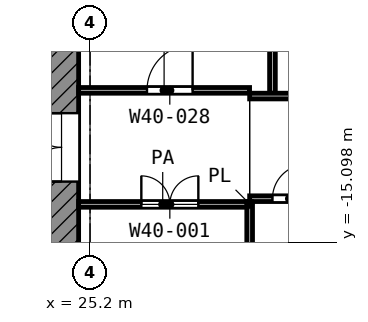
"""IFC4 building model, lengths in metres.
Left out: names, types, materials, properties, quantities, classifications, styles, units other than length and angle.
Written with IfcOpenShell. Run it as: python <this file> out.ifc"""

import sys

from ifc_helpers import new_model, si_unit, direction, frame, frame_2d, origin, place, context, subcontext, project, spatial, rectangle, extrude, element, fill, save


model = new_model("IFC4")
c1 = context("Model", 3, precision=1e-05, world=origin(), true_north=direction((0.0, 1.0)))
c2 = subcontext(c1, "Body", "Model", "MODEL_VIEW")
j1 = project(units=[si_unit("LENGTHUNIT", "METRE"), si_unit("PLANEANGLEUNIT", "RADIAN")], contexts=[c1])
p1 = place(None, origin())
s1 = spatial("IfcSite", under=j1, at=p1, CompositionType="ELEMENT")
p2 = place(p1, origin())
s2 = spatial("IfcBuilding", under=s1, at=p2, CompositionType="ELEMENT")
p3 = place(p2, frame((0.0, 0.0, 196.2)))
s3 = spatial("IfcBuildingStorey", under=s2, at=p3, CompositionType="ELEMENT", Elevation=196.2)
p4 = place(p3, frame((24.45, -24.0, 0.0), z_axis=(0.0, 0.0, 1.0), x_axis=(0.0, 1.0, 0.0)))
e1 = element("IfcWall", 1, at=p4, inside=s3, PredefinedType="SHEAR", context=c2, shape_type="SweptSolid", body=[
    extrude(rectangle(XDim=18.6, YDim=0.9, at=frame_2d((9.3, 0.0))), origin(), (0.0, 0.0, 1.0), 3.6),
])
p5 = place(p4, frame((10.5, 0.0, 0.0)))
e2 = element("IfcOpeningElement", 2, at=p5, cuts=e1, PredefinedType="OPENING", context=c2, shape_type="SweptSolid", body=[
    extrude(rectangle(XDim=1.8, YDim=2.1, at=frame_2d((0.9, 1.05))), frame((0.0, 0.46, 0.0), z_axis=(0.0, -1.0, 0.0), x_axis=(1.0, 0.0, 0.0)), (0.0, 0.0, 1.0), 0.92),
])
p6 = place(p3, frame((29.4, -14.147, 0.0), z_axis=(0.0, 0.0, 1.0), x_axis=(0.0, 1.0, 0.0)))
e3 = element("IfcWall", 3, at=p6, inside=s3, PredefinedType="PARTITIONING", context=c2, shape_type="SweptSolid", body=[
    extrude(rectangle(XDim=0.12, YDim=0.1, at=frame_2d((0.06, 0.0))), origin(), (0.0, 0.0, 1.0), 3.6),
])
p7 = place(p3, frame((24.9, -14.1, 0.0), z_axis=(0.0, 0.0, 1.0), x_axis=(1.0, 0.0, 0.0)))
e4 = element("IfcWall", 4, at=p7, inside=s3, PredefinedType="PARTITIONING", context=c2, shape_type="SweptSolid", body=[
    extrude(rectangle(XDim=4.425, YDim=0.15, at=frame_2d((2.212, 0.0))), origin(), (0.0, 0.0, 1.0), 3.6),
])
p8 = place(p7, frame((1.65, 0.0, 0.0)))
e5 = element("IfcOpeningElement", 5, at=p8, cuts=e4, PredefinedType="OPENING", context=c2, shape_type="SweptSolid", body=[
    extrude(rectangle(XDim=1.5, YDim=2.1, at=frame_2d((0.75, 1.05))), frame((0.0, 0.085, 0.0), z_axis=(0.0, -1.0, 0.0), x_axis=(1.0, 0.0, 0.0)), (0.0, 0.0, 1.0), 0.17),
])
p9 = place(p3, frame((29.4, -13.95, 0.0), z_axis=(0.0, 0.0, 1.0), x_axis=(1.0, 0.0, 0.0)))
e6 = element("IfcWall", 6, at=p9, inside=s3, PredefinedType="PARTITIONING", context=c2, shape_type="SweptSolid", body=[
    extrude(rectangle(XDim=37.72, YDim=0.15, at=frame_2d((18.86, 0.0))), origin(), (0.0, 0.0, 1.0), 3.6),
])
p10 = place(p9, frame((10.15, 0.0, 0.0)))
e7 = element("IfcOpeningElement", 7, at=p10, cuts=e6, PredefinedType="OPENING", context=c2, shape_type="SweptSolid", body=[
    extrude(rectangle(XDim=1.0, YDim=2.1, at=frame_2d((0.5, 1.05))), frame((0.0, 0.085, 0.0), z_axis=(0.0, -1.0, 0.0), x_axis=(1.0, 0.0, 0.0)), (0.0, 0.0, 1.0), 0.17),
])
p11 = place(p9, frame((12.8, 0.0, 0.0)))
e8 = element("IfcOpeningElement", 8, at=p11, cuts=e6, PredefinedType="OPENING", context=c2, shape_type="SweptSolid", body=[
    extrude(rectangle(XDim=1.1, YDim=2.1, at=frame_2d((0.55, 1.05))), frame((0.0, 0.085, 0.0), z_axis=(0.0, -1.0, 0.0), x_axis=(1.0, 0.0, 0.0)), (0.0, 0.0, 1.0), 0.17),
])
p12 = place(p9, frame((19.5, 0.0, 0.0)))
e9 = element("IfcOpeningElement", 9, at=p12, cuts=e6, PredefinedType="OPENING", context=c2, shape_type="SweptSolid", body=[
    extrude(rectangle(XDim=1.2, YDim=2.1, at=frame_2d((0.6, 1.05))), frame((0.0, 0.085, 0.0), z_axis=(0.0, -1.0, 0.0), x_axis=(1.0, 0.0, 0.0)), (0.0, 0.0, 1.0), 0.17),
])
p13 = place(p9, frame((21.7, 0.0, 0.0)))
e10 = element("IfcOpeningElement", 10, at=p13, cuts=e6, PredefinedType="OPENING", context=c2, shape_type="SweptSolid", body=[
    extrude(rectangle(XDim=1.2, YDim=2.1, at=frame_2d((0.6, 1.05))), frame((0.0, 0.085, 0.0), z_axis=(0.0, -1.0, 0.0), x_axis=(1.0, 0.0, 0.0)), (0.0, 0.0, 1.0), 0.17),
])
p14 = place(p9, frame((26.8, 0.0, 0.0)))
e11 = element("IfcOpeningElement", 11, at=p14, cuts=e6, PredefinedType="OPENING", context=c2, shape_type="SweptSolid", body=[
    extrude(rectangle(XDim=1.0, YDim=2.1, at=frame_2d((0.5, 1.05))), frame((0.0, 0.085, 0.0), z_axis=(0.0, -1.0, 0.0), x_axis=(1.0, 0.0, 0.0)), (0.0, 0.0, 1.0), 0.17),
])
p15 = place(p9, frame((31.3, 0.0, 0.0)))
e12 = element("IfcOpeningElement", 12, at=p15, cuts=e6, PredefinedType="OPENING", context=c2, shape_type="SweptSolid", body=[
    extrude(rectangle(XDim=1.0, YDim=2.1, at=frame_2d((0.5, 1.05))), frame((0.0, 0.085, 0.0), z_axis=(0.0, -1.0, 0.0), x_axis=(1.0, 0.0, 0.0)), (0.0, 0.0, 1.0), 0.17),
])
p16 = place(p9, frame((35.5, 0.0, 0.0)))
e13 = element("IfcOpeningElement", 13, at=p16, cuts=e6, PredefinedType="OPENING", context=c2, shape_type="SweptSolid", body=[
    extrude(rectangle(XDim=1.0, YDim=2.1, at=frame_2d((0.5, 1.05))), frame((0.0, 0.085, 0.0), z_axis=(0.0, -1.0, 0.0), x_axis=(1.0, 0.0, 0.0)), (0.0, 0.0, 1.0), 0.17),
])
p17 = place(p9, frame((0.6, 0.0, 0.0)))
e14 = element("IfcOpeningElement", 14, at=p17, cuts=e6, PredefinedType="OPENING", context=c2, shape_type="SweptSolid", body=[
    extrude(rectangle(XDim=0.9, YDim=2.1, at=frame_2d((0.45, 1.05))), frame((0.0, 0.085, 0.0), z_axis=(0.0, -1.0, 0.0), x_axis=(1.0, 0.0, 0.0)), (0.0, 0.0, 1.0), 0.17),
])
p18 = place(p9, frame((2.65, 0.0, 0.0)))
e15 = element("IfcOpeningElement", 15, at=p18, cuts=e6, PredefinedType="OPENING", context=c2, shape_type="SweptSolid", body=[
    extrude(rectangle(XDim=1.0, YDim=2.1, at=frame_2d((0.5, 1.05))), frame((0.0, 0.085, 0.0), z_axis=(0.0, -1.0, 0.0), x_axis=(1.0, 0.0, 0.0)), (0.0, 0.0, 1.0), 0.17),
])
p19 = place(p9, frame((5.85, 0.0, 0.0)))
e16 = element("IfcOpeningElement", 16, at=p19, cuts=e6, PredefinedType="OPENING", context=c2, shape_type="SweptSolid", body=[
    extrude(rectangle(XDim=1.2, YDim=2.1, at=frame_2d((0.6, 1.05))), frame((0.0, 0.085, 0.0), z_axis=(0.0, -1.0, 0.0), x_axis=(1.0, 0.0, 0.0)), (0.0, 0.0, 1.0), 0.17),
])
p20 = place(p3, frame((29.4, -11.25, 0.0), z_axis=(0.0, 0.0, 1.0), x_axis=(1.0, 0.0, 0.0)))
e17 = element("IfcWall", 17, at=p20, inside=s3, PredefinedType="PARTITIONING", context=c2, shape_type="SweptSolid", body=[
    extrude(rectangle(XDim=10.782, YDim=0.15, at=frame_2d((5.391, 0.0))), origin(), (0.0, 0.0, 1.0), 3.6),
])
p21 = place(p20, frame((1.9, 0.0, 0.0)))
e18 = element("IfcOpeningElement", 18, at=p21, cuts=e17, PredefinedType="OPENING", context=c2, shape_type="SweptSolid", body=[
    extrude(rectangle(XDim=1.0, YDim=2.1, at=frame_2d((0.5, 1.05))), frame((0.0, 0.085, 0.0), z_axis=(0.0, -1.0, 0.0), x_axis=(1.0, 0.0, 0.0)), (0.0, 0.0, 1.0), 0.17),
])
p22 = place(p20, frame((4.4, 0.0, 0.0)))
e19 = element("IfcOpeningElement", 19, at=p22, cuts=e17, PredefinedType="OPENING", context=c2, shape_type="SweptSolid", body=[
    extrude(rectangle(XDim=1.2, YDim=2.1, at=frame_2d((0.6, 1.05))), frame((0.0, 0.085, 0.0), z_axis=(0.0, -1.0, 0.0), x_axis=(1.0, 0.0, 0.0)), (0.0, 0.0, 1.0), 0.17),
])
p23 = place(p3, frame((24.9, -11.1, 0.0), z_axis=(0.0, 0.0, 1.0), x_axis=(1.0, 0.0, 0.0)))
e20 = element("IfcWall", 20, at=p23, inside=s3, PredefinedType="PARTITIONING", context=c2, shape_type="SweptSolid", body=[
    extrude(rectangle(XDim=4.498, YDim=0.15, at=frame_2d((2.249, 0.0))), origin(), (0.0, 0.0, 1.0), 3.6),
])
p24 = place(p23, frame((1.799, 0.0, 0.0)))
e21 = element("IfcOpeningElement", 21, at=p24, cuts=e20, PredefinedType="OPENING", context=c2, shape_type="SweptSolid", body=[
    extrude(rectangle(XDim=1.2, YDim=2.1, at=frame_2d((0.6, 1.05))), frame((0.0, 0.085, 0.0), z_axis=(0.0, -1.0, 0.0), x_axis=(1.0, 0.0, 0.0)), (0.0, 0.0, 1.0), 0.17),
])
p25 = place(p3, frame((29.4, -31.198, 0.0), z_axis=(0.0, 0.0, 1.0), x_axis=(0.0, 1.0, 0.0)))
e22 = element("IfcWall", 22, at=p25, inside=s3, PredefinedType="PARTITIONING", context=c2, shape_type="SweptSolid", body=[
    extrude(rectangle(XDim=17.098, YDim=0.15, at=frame_2d((8.549, 0.0))), origin(), (0.0, 0.0, 1.0), 3.6),
])
p26 = place(p3, frame((30.0, -11.175, 0.0), z_axis=(0.0, 0.0, 1.0), x_axis=(0.0, 1.0, 0.0)))
e23 = element("IfcWall", 23, at=p26, inside=s3, PredefinedType="PARTITIONING", context=c2, shape_type="SweptSolid", body=[
    extrude(rectangle(XDim=11.095, YDim=0.15, at=frame_2d((5.547, 0.0))), origin(), (0.0, 0.0, 1.0), 2.7),
])
p27 = place(p5, origin())
e24 = element("IfcDoor", 24, at=p27, inside=s3, OperationType="DOUBLE_DOOR_SINGLE_SWING", PredefinedType="DOOR", context=c2, shape_type="SweptSolid", body=[
    extrude(rectangle(XDim=1.8, YDim=2.1, at=frame_2d((0.9, 1.05))), frame((0.0, 0.025, 0.0), z_axis=(0.0, -1.0, 0.0), x_axis=(1.0, 0.0, 0.0)), (0.0, 0.0, 1.0), 0.05),
])
fill(e2, e24)
p28 = place(p8, origin())
e25 = element("IfcDoor", 25, at=p28, inside=s3, OperationType="DOUBLE_DOOR_SINGLE_SWING", PredefinedType="DOOR", context=c2, shape_type="SweptSolid", body=[
    extrude(rectangle(XDim=1.5, YDim=2.1, at=frame_2d((0.75, 1.05))), frame((0.0, 0.025, 0.0), z_axis=(0.0, -1.0, 0.0), x_axis=(1.0, 0.0, 0.0)), (0.0, 0.0, 1.0), 0.05),
])
fill(e5, e25)
p29 = place(p24, origin())
e26 = element("IfcDoor", 26, at=p29, inside=s3, OperationType="SINGLE_SWING_RIGHT", PredefinedType="DOOR", context=c2, shape_type="SweptSolid", body=[
    extrude(rectangle(XDim=1.2, YDim=2.1, at=frame_2d((0.6, 1.05))), frame((0.0, 0.025, 0.0), z_axis=(0.0, -1.0, 0.0), x_axis=(1.0, 0.0, 0.0)), (0.0, 0.0, 1.0), 0.05),
])
fill(e21, e26)
p30 = place(p17, origin())
e27 = element("IfcDoor", 27, at=p30, inside=s3, OperationType="SINGLE_SWING_RIGHT", PredefinedType="DOOR", context=c2, shape_type="SweptSolid", body=[
    extrude(rectangle(XDim=0.9, YDim=2.1, at=frame_2d((0.45, 1.05))), frame((0.0, 0.025, 0.0), z_axis=(0.0, -1.0, 0.0), x_axis=(1.0, 0.0, 0.0)), (0.0, 0.0, 1.0), 0.05),
])
fill(e14, e27)
save(model, sys.argv[1])
